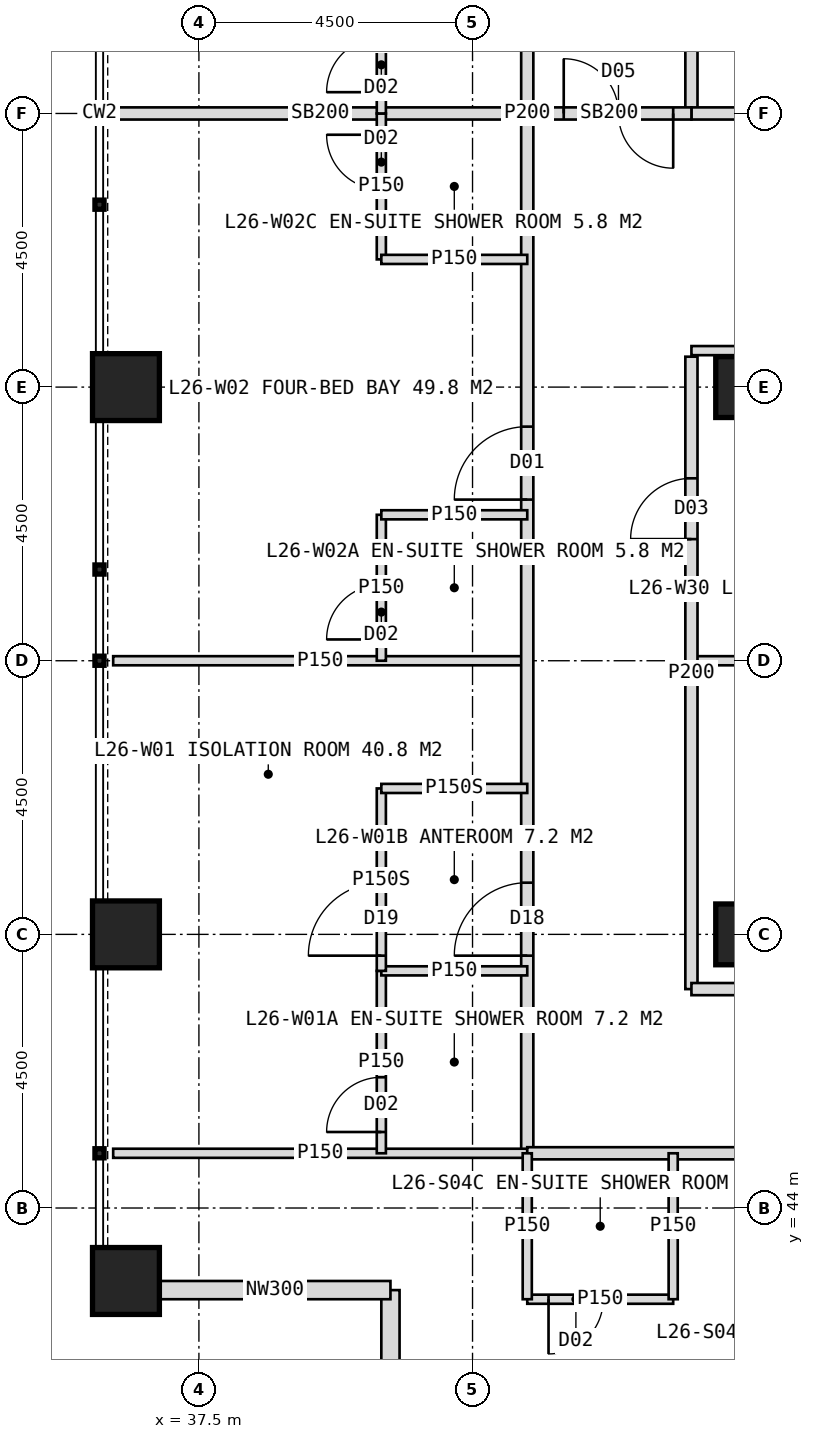
"""IFC4 building model, lengths in metres.
Left out: names, types, materials, properties, quantities, classifications, styles, units other than length and angle.
Written with IfcOpenShell. Run it as: python <this file> out.ifc"""

import sys

from ifc_helpers import new_model, si_unit, direction, frame, frame_2d, origin, origin_2d, place, context, subcontext, project, spatial, rectangle, hollow_rectangle, extrude, element, fill, save


model = new_model("IFC4")
c1 = context("Model", 3, precision=1e-05, world=origin(), true_north=direction((0.0, 1.0)))
c2 = subcontext(c1, "Body", "Model", "MODEL_VIEW")
j1 = project(units=[si_unit("LENGTHUNIT", "METRE"), si_unit("PLANEANGLEUNIT", "RADIAN")], contexts=[c1])
p1 = place(None, origin())
s1 = spatial("IfcSite", under=j1, at=p1, CompositionType="ELEMENT")
p2 = place(p1, origin())
s2 = spatial("IfcBuilding", under=s1, at=p2, CompositionType="ELEMENT")
p3 = place(p2, frame((0.0, 0.0, 112.0)))
s3 = spatial("IfcBuildingStorey", under=s2, at=p3, CompositionType="ELEMENT", Elevation=112.0)
for number, where, z_axis, x_axis in (
    (1, (46.5, 48.5, 0.0), (0.0, 0.0, 1.0), (1.0, 0.0, 0.0)),
    (2, (46.5, 57.5, 0.0), (0.0, 0.0, 1.0), (1.0, 0.0, 0.0)),
):
    element("IfcColumn", number, at=place(p3, frame(where, z_axis=z_axis, x_axis=x_axis)), inside=s3, PredefinedType="COLUMN", context=c2, shape_type="SweptSolid", body=[
        extrude(hollow_rectangle(XDim=1.0, YDim=1.0, WallThickness=0.1, at=origin_2d()), origin(), (0.0, 0.0, 1.0), 4.0),
    ])
for number, where, z_axis, x_axis in (
    (3, (36.3, 42.8, 0.0), (0.0, 0.0, 1.0), (1.0, 0.0, 0.0)),
    (4, (36.3, 48.5, 0.0), (0.0, 0.0, 1.0), (1.0, 0.0, 0.0)),
    (5, (36.3, 57.5, 0.0), (0.0, 0.0, 1.0), (1.0, 0.0, 0.0)),
):
    element("IfcColumn", number, at=place(p3, frame(where, z_axis=z_axis, x_axis=x_axis)), inside=s3, PredefinedType="COLUMN", context=c2, shape_type="SweptSolid", body=[
        extrude(hollow_rectangle(XDim=1.1, YDim=1.1, WallThickness=0.1, at=origin_2d()), origin(), (0.0, 0.0, 1.0), 4.0),
    ])
for number, where, z_axis, x_axis in (
    (6, (40.65, 38.85, 0.0), (0.0, 0.0, 1.0), (0.0, 1.0, 0.0)),
    (7, (40.65, 42.65, 0.0), (0.0, 0.0, 1.0), (-1.0, 0.0, 0.0)),
):
    element("IfcWall", number, at=place(p3, frame(where, z_axis=z_axis, x_axis=x_axis)), inside=s3, PredefinedType="ELEMENTEDWALL", context=c2, shape_type="SweptSolid", body=[
        extrude(rectangle(XDim=3.8, YDim=0.3, at=frame_2d((1.9, 0.0))), origin(), (0.0, 0.0, 1.0), 4.0),
    ])
p4 = place(p3, frame((42.9, 53.0, 0.0), z_axis=(0.0, 0.0, 1.0), x_axis=(-1.0, 0.0, 0.0)))
e8 = element("IfcWall", 8, at=p4, inside=s3, PredefinedType="PARTITIONING", context=c2, shape_type="SweptSolid", body=[
    extrude(rectangle(XDim=6.81, YDim=0.15, at=frame_2d((3.405, 0.0))), origin(), (0.0, 0.0, 1.0), 3.75),
])
p5 = place(p3, frame((42.9, 62.0, 0.0), z_axis=(0.0, 0.0, 1.0), x_axis=(-1.0, 0.0, 0.0)))
e9 = element("IfcWall", 9, at=p5, inside=s3, PredefinedType="SOLIDWALL", context=c2, shape_type="SweptSolid", body=[
    extrude(rectangle(XDim=6.81, YDim=0.2, at=frame_2d((3.405, 0.0))), origin(), (0.0, 0.0, 1.0), 2.95),
])
p6 = place(p3, frame((42.9, 44.9, 0.0), z_axis=(0.0, 0.0, 1.0), x_axis=(0.0, 1.0, 0.0)))
e10 = element("IfcWall", 10, at=p6, inside=s3, PredefinedType="PARTITIONING", context=c2, shape_type="SweptSolid", body=[
    extrude(rectangle(XDim=34.2, YDim=0.2, at=frame_2d((17.1, 0.0))), origin(), (0.0, 0.0, 1.0), 3.75),
])
p7 = place(p6, frame((3.25, 0.0, 0.0)))
e11 = element("IfcOpeningElement", 11, at=p7, cuts=e10, PredefinedType="OPENING", context=c2, shape_type="SweptSolid", body=[
    extrude(rectangle(XDim=1.2, YDim=2.2, at=frame_2d((0.6, 1.1))), frame((0.0, 0.11, 0.0), z_axis=(0.0, -1.0, 0.0), x_axis=(1.0, 0.0, 0.0)), (0.0, 0.0, 1.0), 0.22),
])
p8 = place(p6, frame((10.75, 0.0, 0.0)))
e12 = element("IfcOpeningElement", 12, at=p8, cuts=e10, PredefinedType="OPENING", context=c2, shape_type="SweptSolid", body=[
    extrude(rectangle(XDim=1.2, YDim=2.2, at=frame_2d((0.6, 1.1))), frame((0.0, 0.11, 0.0), z_axis=(0.0, -1.0, 0.0), x_axis=(1.0, 0.0, 0.0)), (0.0, 0.0, 1.0), 0.22),
])
p9 = place(p6, frame((19.75, 0.0, 0.0)))
e13 = element("IfcOpeningElement", 13, at=p9, cuts=e10, PredefinedType="OPENING", context=c2, shape_type="SweptSolid", body=[
    extrude(rectangle(XDim=1.2, YDim=2.2, at=frame_2d((0.6, 1.1))), frame((0.0, 0.11, 0.0), z_axis=(0.0, -1.0, 0.0), x_axis=(1.0, 0.0, 0.0)), (0.0, 0.0, 1.0), 0.22),
])
p10 = place(p6, frame((28.75, 0.0, 0.0)))
e14 = element("IfcOpeningElement", 14, at=p10, cuts=e10, PredefinedType="OPENING", context=c2, shape_type="SweptSolid", body=[
    extrude(rectangle(XDim=1.2, YDim=2.2, at=frame_2d((0.6, 1.1))), frame((0.0, 0.11, 0.0), z_axis=(0.0, -1.0, 0.0), x_axis=(1.0, 0.0, 0.0)), (0.0, 0.0, 1.0), 0.22),
])
p11 = place(p3, frame((42.9, 44.9, 0.0), z_axis=(0.0, 0.0, 1.0), x_axis=(-1.0, 0.0, 0.0)))
e15 = element("IfcWall", 15, at=p11, inside=s3, PredefinedType="PARTITIONING", context=c2, shape_type="SweptSolid", body=[
    extrude(rectangle(XDim=6.81, YDim=0.15, at=frame_2d((3.405, 0.0))), origin(), (0.0, 0.0, 1.0), 3.75),
])
p12 = place(p3, frame((40.5, 44.9, 0.0), z_axis=(0.0, 0.0, 1.0), x_axis=(0.0, 1.0, 0.0)))
e16 = element("IfcWall", 16, at=p12, inside=s3, PredefinedType="PARTITIONING", context=c2, shape_type="SweptSolid", body=[
    extrude(rectangle(XDim=3.0, YDim=0.15, at=frame_2d((1.5, 0.0))), origin(), (0.0, 0.0, 1.0), 3.75),
])
p13 = place(p12, frame((0.35, 0.0, 0.0)))
e17 = element("IfcOpeningElement", 17, at=p13, cuts=e16, PredefinedType="OPENING", context=c2, shape_type="SweptSolid", body=[
    extrude(rectangle(XDim=0.9, YDim=2.1, at=frame_2d((0.45, 1.05))), frame((0.0, 0.085, 0.0), z_axis=(0.0, -1.0, 0.0), x_axis=(1.0, 0.0, 0.0)), (0.0, 0.0, 1.0), 0.17),
])
p14 = place(p3, frame((42.9, 47.9, 0.0), z_axis=(0.0, 0.0, 1.0), x_axis=(-1.0, 0.0, 0.0)))
e18 = element("IfcWall", 18, at=p14, inside=s3, PredefinedType="PARTITIONING", context=c2, shape_type="SweptSolid", body=[
    extrude(rectangle(XDim=2.4, YDim=0.15, at=frame_2d((1.2, 0.0))), origin(), (0.0, 0.0, 1.0), 3.75),
])
p15 = place(p3, frame((40.5, 47.9, 0.0), z_axis=(0.0, 0.0, 1.0), x_axis=(0.0, 1.0, 0.0)))
e19 = element("IfcWall", 19, at=p15, inside=s3, PredefinedType="PARTITIONING", context=c2, shape_type="SweptSolid", body=[
    extrude(rectangle(XDim=3.0, YDim=0.15, at=frame_2d((1.5, 0.0))), origin(), (0.0, 0.0, 1.0), 3.75),
])
p16 = place(p15, frame((0.25, 0.0, 0.0)))
e20 = element("IfcOpeningElement", 20, at=p16, cuts=e19, PredefinedType="OPENING", context=c2, shape_type="SweptSolid", body=[
    extrude(rectangle(XDim=1.2, YDim=2.2, at=frame_2d((0.6, 1.1))), frame((0.0, 0.085, 0.0), z_axis=(0.0, -1.0, 0.0), x_axis=(1.0, 0.0, 0.0)), (0.0, 0.0, 1.0), 0.17),
])
p17 = place(p3, frame((42.9, 50.9, 0.0), z_axis=(0.0, 0.0, 1.0), x_axis=(-1.0, 0.0, 0.0)))
e21 = element("IfcWall", 21, at=p17, inside=s3, PredefinedType="PARTITIONING", context=c2, shape_type="SweptSolid", body=[
    extrude(rectangle(XDim=2.4, YDim=0.15, at=frame_2d((1.2, 0.0))), origin(), (0.0, 0.0, 1.0), 3.75),
])
p18 = place(p3, frame((40.5, 53.0, 0.0), z_axis=(0.0, 0.0, 1.0), x_axis=(0.0, 1.0, 0.0)))
e22 = element("IfcWall", 22, at=p18, inside=s3, PredefinedType="PARTITIONING", context=c2, shape_type="SweptSolid", body=[
    extrude(rectangle(XDim=2.4, YDim=0.15, at=frame_2d((1.2, 0.0))), origin(), (0.0, 0.0, 1.0), 3.75),
])
p19 = place(p18, frame((0.35, 0.0, 0.0)))
e23 = element("IfcOpeningElement", 23, at=p19, cuts=e22, PredefinedType="OPENING", context=c2, shape_type="SweptSolid", body=[
    extrude(rectangle(XDim=0.9, YDim=2.1, at=frame_2d((0.45, 1.05))), frame((0.0, 0.085, 0.0), z_axis=(0.0, -1.0, 0.0), x_axis=(1.0, 0.0, 0.0)), (0.0, 0.0, 1.0), 0.17),
])
p20 = place(p3, frame((42.9, 55.4, 0.0), z_axis=(0.0, 0.0, 1.0), x_axis=(-1.0, 0.0, 0.0)))
e24 = element("IfcWall", 24, at=p20, inside=s3, PredefinedType="PARTITIONING", context=c2, shape_type="SweptSolid", body=[
    extrude(rectangle(XDim=2.4, YDim=0.15, at=frame_2d((1.2, 0.0))), origin(), (0.0, 0.0, 1.0), 3.75),
])
p21 = place(p3, frame((40.5, 59.6, 0.0), z_axis=(0.0, 0.0, 1.0), x_axis=(0.0, 1.0, 0.0)))
e25 = element("IfcWall", 25, at=p21, inside=s3, PredefinedType="PARTITIONING", context=c2, shape_type="SweptSolid", body=[
    extrude(rectangle(XDim=2.4, YDim=0.15, at=frame_2d((1.2, 0.0))), origin(), (0.0, 0.0, 1.0), 3.75),
])
p22 = place(p21, frame((1.15, 0.0, 0.0)))
e26 = element("IfcOpeningElement", 26, at=p22, cuts=e25, PredefinedType="OPENING", context=c2, shape_type="SweptSolid", body=[
    extrude(rectangle(XDim=0.9, YDim=2.1, at=frame_2d((0.45, 1.05))), frame((0.0, 0.085, 0.0), z_axis=(0.0, -1.0, 0.0), x_axis=(1.0, 0.0, 0.0)), (0.0, 0.0, 1.0), 0.17),
])
p23 = place(p3, frame((42.9, 59.6, 0.0), z_axis=(0.0, 0.0, 1.0), x_axis=(-1.0, 0.0, 0.0)))
e27 = element("IfcWall", 27, at=p23, inside=s3, PredefinedType="PARTITIONING", context=c2, shape_type="SweptSolid", body=[
    extrude(rectangle(XDim=2.4, YDim=0.15, at=frame_2d((1.2, 0.0))), origin(), (0.0, 0.0, 1.0), 3.75),
])
p24 = place(p3, frame((40.5, 62.0, 0.0), z_axis=(0.0, 0.0, 1.0), x_axis=(0.0, 1.0, 0.0)))
e28 = element("IfcWall", 28, at=p24, inside=s3, PredefinedType="PARTITIONING", context=c2, shape_type="SweptSolid", body=[
    extrude(rectangle(XDim=2.4, YDim=0.15, at=frame_2d((1.2, 0.0))), origin(), (0.0, 0.0, 1.0), 3.75),
])
p25 = place(p24, frame((0.35, 0.0, 0.0)))
e29 = element("IfcOpeningElement", 29, at=p25, cuts=e28, PredefinedType="OPENING", context=c2, shape_type="SweptSolid", body=[
    extrude(rectangle(XDim=0.9, YDim=2.1, at=frame_2d((0.45, 1.05))), frame((0.0, 0.085, 0.0), z_axis=(0.0, -1.0, 0.0), x_axis=(1.0, 0.0, 0.0)), (0.0, 0.0, 1.0), 0.17),
])
p26 = place(p3, frame((51.0, 53.0, 0.0), z_axis=(0.0, 0.0, 1.0), x_axis=(-1.0, 0.0, 0.0)))
e30 = element("IfcWall", 30, at=p26, inside=s3, PredefinedType="PARTITIONING", context=c2, shape_type="SweptSolid", body=[
    extrude(rectangle(XDim=5.4, YDim=0.15, at=frame_2d((2.7, 0.0))), origin(), (0.0, 0.0, 1.0), 3.75),
])
p27 = place(p3, frame((45.6, 47.6, 0.0), z_axis=(0.0, 0.0, 1.0), x_axis=(0.0, 1.0, 0.0)))
e31 = element("IfcWall", 31, at=p27, inside=s3, PredefinedType="PARTITIONING", context=c2, shape_type="SweptSolid", body=[
    extrude(rectangle(XDim=10.4, YDim=0.2, at=frame_2d((5.2, 0.0))), origin(), (0.0, 0.0, 1.0), 3.75),
])
p28 = place(p27, frame((7.4, 0.0, 0.0)))
e32 = element("IfcOpeningElement", 32, at=p28, cuts=e31, PredefinedType="OPENING", context=c2, shape_type="SweptSolid", body=[
    extrude(rectangle(XDim=1.0, YDim=2.1, at=frame_2d((0.5, 1.05))), frame((0.0, 0.11, 0.0), z_axis=(0.0, -1.0, 0.0), x_axis=(1.0, 0.0, 0.0)), (0.0, 0.0, 1.0), 0.22),
])
p29 = place(p3, frame((45.6, 62.0, 0.0), z_axis=(0.0, 0.0, 1.0), x_axis=(0.0, 1.0, 0.0)))
e33 = element("IfcWall", 33, at=p29, inside=s3, PredefinedType="PARTITIONING", context=c2, shape_type="SweptSolid", body=[
    extrude(rectangle(XDim=14.4, YDim=0.2, at=frame_2d((7.2, 0.0))), origin(), (0.0, 0.0, 1.0), 3.75),
])
p30 = place(p29, frame((1.45, 0.0, 0.0)))
e34 = element("IfcOpeningElement", 34, at=p30, cuts=e33, PredefinedType="OPENING", context=c2, shape_type="SweptSolid", body=[
    extrude(rectangle(XDim=1.0, YDim=2.1, at=frame_2d((0.5, 1.05))), frame((0.0, 0.11, 0.0), z_axis=(0.0, -1.0, 0.0), x_axis=(1.0, 0.0, 0.0)), (0.0, 0.0, 1.0), 0.22),
])
p31 = place(p29, frame((11.2, 0.0, 0.0)))
e35 = element("IfcOpeningElement", 35, at=p31, cuts=e33, PredefinedType="OPENING", context=c2, shape_type="SweptSolid", body=[
    extrude(rectangle(XDim=1.0, YDim=2.1, at=frame_2d((0.5, 1.05))), frame((0.0, 0.11, 0.0), z_axis=(0.0, -1.0, 0.0), x_axis=(1.0, 0.0, 0.0)), (0.0, 0.0, 1.0), 0.22),
])
p32 = place(p3, frame((51.0, 58.1, 0.0), z_axis=(0.0, 0.0, 1.0), x_axis=(-1.0, 0.0, 0.0)))
e36 = element("IfcWall", 36, at=p32, inside=s3, PredefinedType="PARTITIONING", context=c2, shape_type="SweptSolid", body=[
    extrude(rectangle(XDim=5.4, YDim=0.15, at=frame_2d((2.7, 0.0))), origin(), (0.0, 0.0, 1.0), 3.75),
])
p33 = place(p32, frame((0.6, 0.0, 0.0)))
e37 = element("IfcOpeningElement", 37, at=p33, cuts=e36, PredefinedType="OPENING", context=c2, shape_type="SweptSolid", body=[
    extrude(rectangle(XDim=0.9, YDim=2.1, at=frame_2d((0.45, 1.05))), frame((0.0, 0.085, 0.0), z_axis=(0.0, -1.0, 0.0), x_axis=(1.0, 0.0, 0.0)), (0.0, 0.0, 1.0), 0.17),
])
p34 = place(p3, frame((51.0, 62.0, 0.0), z_axis=(0.0, 0.0, 1.0), x_axis=(-1.0, 0.0, 0.0)))
e38 = element("IfcWall", 38, at=p34, inside=s3, PredefinedType="SOLIDWALL", context=c2, shape_type="SweptSolid", body=[
    extrude(rectangle(XDim=5.4, YDim=0.2, at=frame_2d((2.7, 0.0))), origin(), (0.0, 0.0, 1.0), 2.95),
])
p35 = place(p3, frame((77.1, 44.9, 0.0), z_axis=(0.0, 0.0, 1.0), x_axis=(-1.0, 0.0, 0.0)))
e39 = element("IfcWall", 39, at=p35, inside=s3, PredefinedType="PARTITIONING", context=c2, shape_type="SweptSolid", body=[
    extrude(rectangle(XDim=34.2, YDim=0.2, at=frame_2d((17.1, 0.0))), origin(), (0.0, 0.0, 1.0), 3.75),
])
p36 = place(p35, frame((3.25, 0.0, 0.0)))
e40 = element("IfcOpeningElement", 40, at=p36, cuts=e39, PredefinedType="OPENING", context=c2, shape_type="SweptSolid", body=[
    extrude(rectangle(XDim=1.2, YDim=2.2, at=frame_2d((0.6, 1.1))), frame((0.0, 0.11, 0.0), z_axis=(0.0, -1.0, 0.0), x_axis=(1.0, 0.0, 0.0)), (0.0, 0.0, 1.0), 0.22),
])
p37 = place(p35, frame((9.25, 0.0, 0.0)))
e41 = element("IfcOpeningElement", 41, at=p37, cuts=e39, PredefinedType="OPENING", context=c2, shape_type="SweptSolid", body=[
    extrude(rectangle(XDim=1.2, YDim=2.2, at=frame_2d((0.6, 1.1))), frame((0.0, 0.11, 0.0), z_axis=(0.0, -1.0, 0.0), x_axis=(1.0, 0.0, 0.0)), (0.0, 0.0, 1.0), 0.22),
])
p38 = place(p35, frame((18.25, 0.0, 0.0)))
e42 = element("IfcOpeningElement", 42, at=p38, cuts=e39, PredefinedType="OPENING", context=c2, shape_type="SweptSolid", body=[
    extrude(rectangle(XDim=1.2, YDim=2.2, at=frame_2d((0.6, 1.1))), frame((0.0, 0.11, 0.0), z_axis=(0.0, -1.0, 0.0), x_axis=(1.0, 0.0, 0.0)), (0.0, 0.0, 1.0), 0.22),
])
p39 = place(p35, frame((27.25, 0.0, 0.0)))
e43 = element("IfcOpeningElement", 43, at=p39, cuts=e39, PredefinedType="OPENING", context=c2, shape_type="SweptSolid", body=[
    extrude(rectangle(XDim=1.2, YDim=2.2, at=frame_2d((0.6, 1.1))), frame((0.0, 0.11, 0.0), z_axis=(0.0, -1.0, 0.0), x_axis=(1.0, 0.0, 0.0)), (0.0, 0.0, 1.0), 0.22),
])
p40 = place(p3, frame((45.3, 42.5, 0.0), z_axis=(0.0, 0.0, 1.0), x_axis=(-1.0, 0.0, 0.0)))
e44 = element("IfcWall", 44, at=p40, inside=s3, PredefinedType="PARTITIONING", context=c2, shape_type="SweptSolid", body=[
    extrude(rectangle(XDim=2.4, YDim=0.15, at=frame_2d((1.2, 0.0))), origin(), (0.0, 0.0, 1.0), 3.75),
])
p41 = place(p40, frame((1.15, 0.0, 0.0)))
e45 = element("IfcOpeningElement", 45, at=p41, cuts=e44, PredefinedType="OPENING", context=c2, shape_type="SweptSolid", body=[
    extrude(rectangle(XDim=0.9, YDim=2.1, at=frame_2d((0.45, 1.05))), frame((0.0, 0.085, 0.0), z_axis=(0.0, -1.0, 0.0), x_axis=(1.0, 0.0, 0.0)), (0.0, 0.0, 1.0), 0.17),
])
for number, where, z_axis, x_axis in (
    (46, (45.3, 44.9, 0.0), (0.0, 0.0, 1.0), (0.0, -1.0, 0.0)),
    (47, (42.9, 44.9, 0.0), (0.0, 0.0, 1.0), (0.0, -1.0, 0.0)),
):
    element("IfcWall", number, at=place(p3, frame(where, z_axis=z_axis, x_axis=x_axis)), inside=s3, PredefinedType="PARTITIONING", context=c2, shape_type="SweptSolid", body=[
        extrude(rectangle(XDim=2.4, YDim=0.15, at=frame_2d((1.2, 0.0))), origin(), (0.0, 0.0, 1.0), 3.75),
    ])
p42 = place(p3, frame((57.75, 47.6, 0.0), z_axis=(0.0, 0.0, 1.0), x_axis=(-1.0, 0.0, 0.0)))
e48 = element("IfcWall", 48, at=p42, inside=s3, PredefinedType="PARTITIONING", context=c2, shape_type="SweptSolid", body=[
    extrude(rectangle(XDim=12.15, YDim=0.2, at=frame_2d((6.075, 0.0))), origin(), (0.0, 0.0, 1.0), 3.75),
])
p43 = place(p42, frame((3.55, 0.0, 0.0)))
e49 = element("IfcOpeningElement", 49, at=p43, cuts=e48, PredefinedType="OPENING", context=c2, shape_type="SweptSolid", body=[
    extrude(rectangle(XDim=1.0, YDim=2.1, at=frame_2d((0.5, 1.05))), frame((0.0, 0.11, 0.0), z_axis=(0.0, -1.0, 0.0), x_axis=(1.0, 0.0, 0.0)), (0.0, 0.0, 1.0), 0.22),
])
p44 = place(p42, frame((8.2, 0.0, 0.0)))
e50 = element("IfcOpeningElement", 50, at=p44, cuts=e48, PredefinedType="OPENING", context=c2, shape_type="SweptSolid", body=[
    extrude(rectangle(XDim=1.0, YDim=2.1, at=frame_2d((0.5, 1.05))), frame((0.0, 0.11, 0.0), z_axis=(0.0, -1.0, 0.0), x_axis=(1.0, 0.0, 0.0)), (0.0, 0.0, 1.0), 0.22),
])
p45 = place(p3, frame((45.6, 62.0, 0.0), z_axis=(0.0, 0.0, 1.0), x_axis=(-1.0, 0.0, 0.0)))
e51 = element("IfcWall", 51, at=p45, inside=s3, PredefinedType="SOLIDWALL", context=c2, shape_type="SweptSolid", body=[
    extrude(rectangle(XDim=2.7, YDim=0.2, at=frame_2d((1.35, 0.0))), origin(), (0.0, 0.0, 1.0), 2.95),
])
p46 = place(p45, frame((0.3, 0.0, 0.0)))
e52 = element("IfcOpeningElement", 52, at=p46, cuts=e51, PredefinedType="OPENING", context=c2, shape_type="SweptSolid", body=[
    extrude(rectangle(XDim=1.8, YDim=2.2, at=frame_2d((0.9, 1.1))), frame((0.0, 0.11, 0.0), z_axis=(0.0, -1.0, 0.0), x_axis=(1.0, 0.0, 0.0)), (0.0, 0.0, 1.0), 0.22),
])
p47 = place(p16, origin())
e53 = element("IfcDoor", 53, at=p47, inside=s3, OperationType="SINGLE_SWING_LEFT", PredefinedType="DOOR", context=c2, shape_type="SweptSolid", body=[
    extrude(rectangle(XDim=1.2, YDim=2.2, at=frame_2d((0.6, 1.1))), frame((0.0, 0.025, 0.0), z_axis=(0.0, -1.0, 0.0), x_axis=(1.0, 0.0, 0.0)), (0.0, 0.0, 1.0), 0.05),
])
fill(e20, e53)
p48 = place(p7, origin())
e54 = element("IfcDoor", 54, at=p48, inside=s3, OperationType="SINGLE_SWING_LEFT", PredefinedType="DOOR", context=c2, shape_type="SweptSolid", body=[
    extrude(rectangle(XDim=1.2, YDim=2.2, at=frame_2d((0.6, 1.1))), frame((0.0, 0.025, 0.0), z_axis=(0.0, -1.0, 0.0), x_axis=(1.0, 0.0, 0.0)), (0.0, 0.0, 1.0), 0.05),
])
fill(e11, e54)
p49 = place(p13, origin())
e55 = element("IfcDoor", 55, at=p49, inside=s3, OperationType="SINGLE_SWING_LEFT", PredefinedType="DOOR", context=c2, shape_type="SweptSolid", body=[
    extrude(rectangle(XDim=0.9, YDim=2.1, at=frame_2d((0.45, 1.05))), frame((0.0, 0.025, 0.0), z_axis=(0.0, -1.0, 0.0), x_axis=(1.0, 0.0, 0.0)), (0.0, 0.0, 1.0), 0.05),
])
fill(e17, e55)
p50 = place(p8, origin())
e56 = element("IfcDoor", 56, at=p50, inside=s3, OperationType="SINGLE_SWING_LEFT", PredefinedType="DOOR", context=c2, shape_type="SweptSolid", body=[
    extrude(rectangle(XDim=1.2, YDim=2.2, at=frame_2d((0.6, 1.1))), frame((0.0, 0.025, 0.0), z_axis=(0.0, -1.0, 0.0), x_axis=(1.0, 0.0, 0.0)), (0.0, 0.0, 1.0), 0.05),
])
fill(e12, e56)
p51 = place(p19, origin())
e57 = element("IfcDoor", 57, at=p51, inside=s3, OperationType="SINGLE_SWING_LEFT", PredefinedType="DOOR", context=c2, shape_type="SweptSolid", body=[
    extrude(rectangle(XDim=0.9, YDim=2.1, at=frame_2d((0.45, 1.05))), frame((0.0, 0.025, 0.0), z_axis=(0.0, -1.0, 0.0), x_axis=(1.0, 0.0, 0.0)), (0.0, 0.0, 1.0), 0.05),
])
fill(e23, e57)
p52 = place(p22, origin())
e58 = element("IfcDoor", 58, at=p52, inside=s3, OperationType="SINGLE_SWING_RIGHT", PredefinedType="DOOR", context=c2, shape_type="SweptSolid", body=[
    extrude(rectangle(XDim=0.9, YDim=2.1, at=frame_2d((0.45, 1.05))), frame((0.0, 0.025, 0.0), z_axis=(0.0, -1.0, 0.0), x_axis=(1.0, 0.0, 0.0)), (0.0, 0.0, 1.0), 0.05),
])
fill(e26, e58)
p53 = place(p25, origin())
e59 = element("IfcDoor", 59, at=p53, inside=s3, OperationType="SINGLE_SWING_LEFT", PredefinedType="DOOR", context=c2, shape_type="SweptSolid", body=[
    extrude(rectangle(XDim=0.9, YDim=2.1, at=frame_2d((0.45, 1.05))), frame((0.0, 0.025, 0.0), z_axis=(0.0, -1.0, 0.0), x_axis=(1.0, 0.0, 0.0)), (0.0, 0.0, 1.0), 0.05),
])
fill(e29, e59)
p54 = place(p28, origin())
e60 = element("IfcDoor", 60, at=p54, inside=s3, OperationType="SINGLE_SWING_LEFT", PredefinedType="DOOR", context=c2, shape_type="SweptSolid", body=[
    extrude(rectangle(XDim=1.0, YDim=2.1, at=frame_2d((0.5, 1.05))), frame((0.0, 0.025, 0.0), z_axis=(0.0, -1.0, 0.0), x_axis=(1.0, 0.0, 0.0)), (0.0, 0.0, 1.0), 0.05),
])
fill(e32, e60)
p55 = place(p41, origin())
e61 = element("IfcDoor", 61, at=p55, inside=s3, OperationType="SINGLE_SWING_RIGHT", PredefinedType="DOOR", context=c2, shape_type="SweptSolid", body=[
    extrude(rectangle(XDim=0.9, YDim=2.1, at=frame_2d((0.45, 1.05))), frame((0.0, 0.025, 0.0), z_axis=(0.0, -1.0, 0.0), x_axis=(1.0, 0.0, 0.0)), (0.0, 0.0, 1.0), 0.05),
])
fill(e45, e61)
p56 = place(p46, origin())
e62 = element("IfcDoor", 62, at=p56, inside=s3, OperationType="DOUBLE_DOOR_DOUBLE_SWING", PredefinedType="DOOR", context=c2, shape_type="SweptSolid", body=[
    extrude(rectangle(XDim=1.8, YDim=2.2, at=frame_2d((0.9, 1.1))), frame((0.0, 0.025, 0.0), z_axis=(0.0, -1.0, 0.0), x_axis=(1.0, 0.0, 0.0)), (0.0, 0.0, 1.0), 0.05),
])
fill(e52, e62)
save(model, sys.argv[1])
